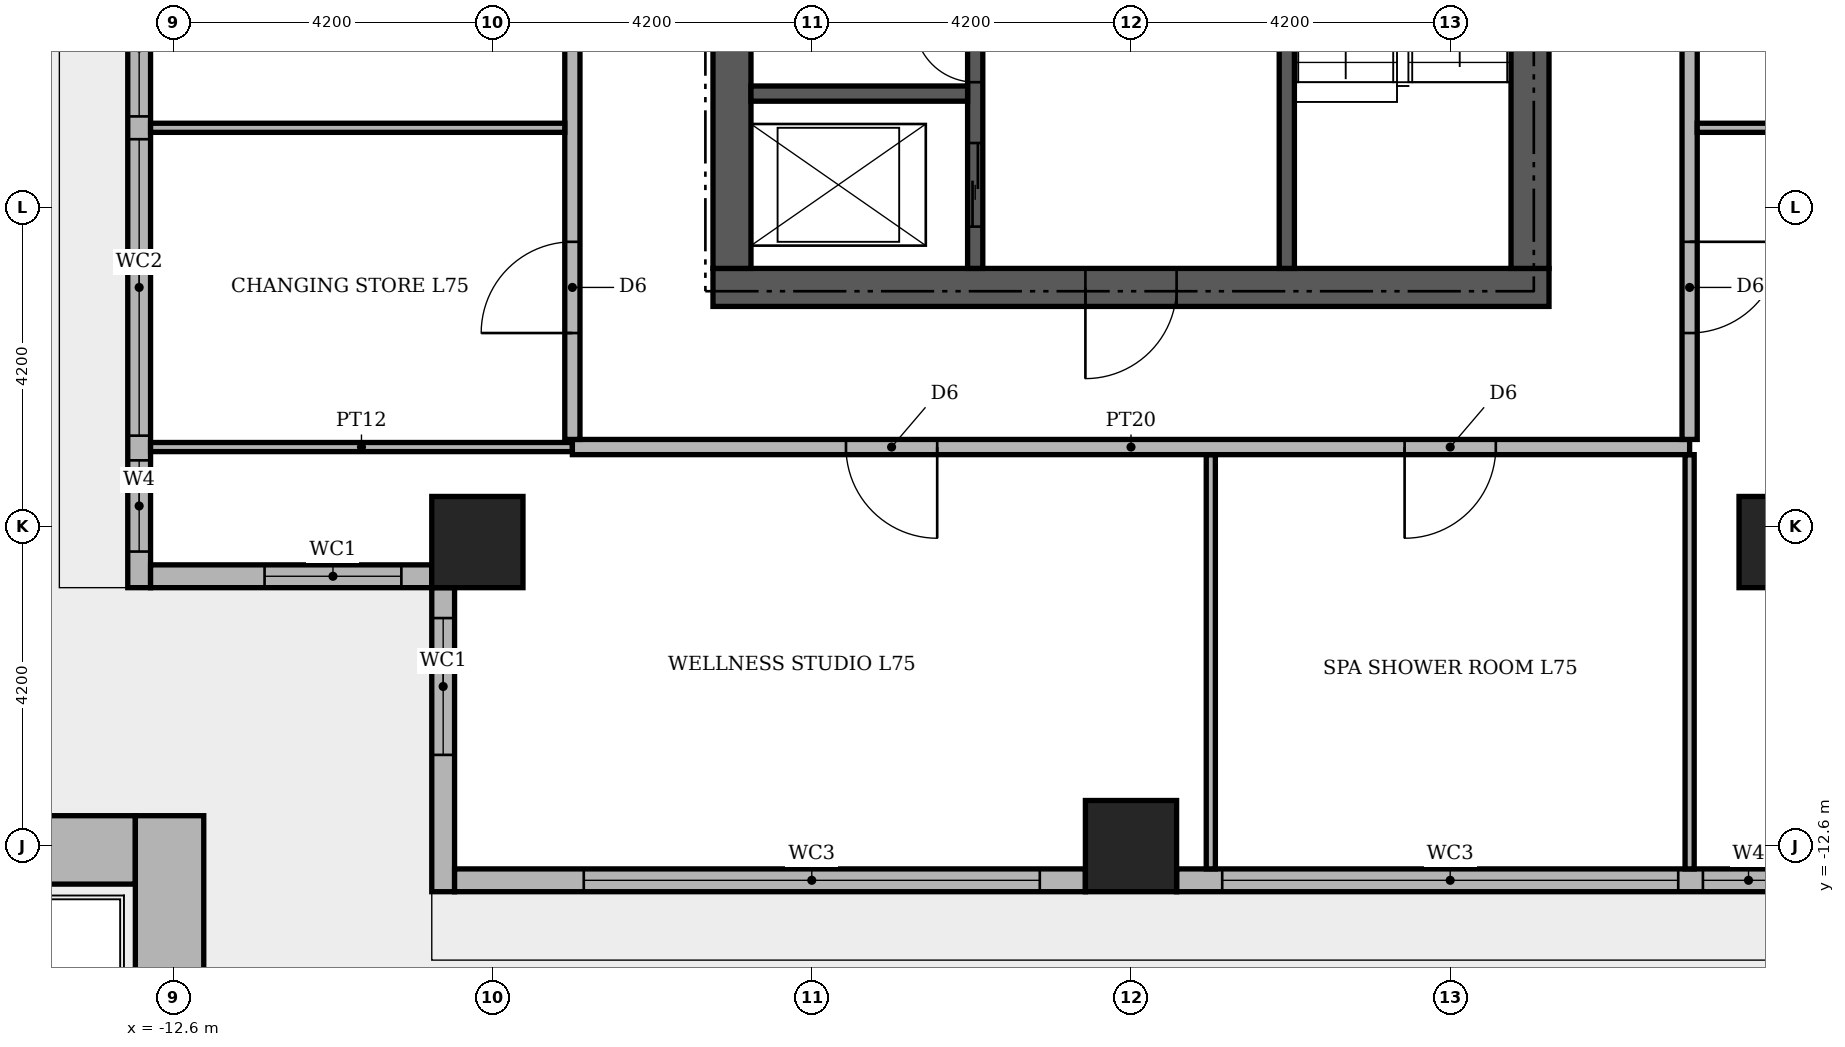
"""IFC4 building model, lengths in metres.
Left out: names, types, materials, properties, quantities, classifications, styles, units other than length and angle.
Written with IfcOpenShell. Run it as: python <this file> out.ifc"""

import sys

from ifc_helpers import new_model, si_unit, direction, frame, frame_2d, origin, origin_2d, place, context, subcontext, project, spatial, rectangle, extrude, element, fill, save


model = new_model("IFC4")
c1 = context("Model", 3, precision=1e-05, world=origin(), true_north=direction((0.0, 1.0)))
c2 = subcontext(c1, "Body", "Model", "MODEL_VIEW")
j1 = project(units=[si_unit("LENGTHUNIT", "METRE"), si_unit("PLANEANGLEUNIT", "RADIAN")], contexts=[c1])
p1 = place(None, origin())
s1 = spatial("IfcSite", under=j1, at=p1, CompositionType="ELEMENT")
p2 = place(p1, origin())
s2 = spatial("IfcBuilding", under=s1, at=p2, CompositionType="ELEMENT")
p3 = place(p2, frame((0.0, 0.0, 312.3)))
s3 = spatial("IfcBuildingStorey", under=s2, at=p3, CompositionType="ELEMENT", Elevation=312.3)
p4 = place(p3, frame((-5.5, -5.25, 0.0), z_axis=(0.0, 0.0, 1.0), x_axis=(1.0, 0.0, 0.0)))
e1 = element("IfcWall", 1, at=p4, inside=s3, PredefinedType="SHEAR", context=c2, shape_type="SweptSolid", body=[
    extrude(rectangle(XDim=11.0, YDim=0.5, at=frame_2d((5.5, 0.0))), origin(), (0.0, 0.0, 1.0), 3.55),
])
p5 = place(p4, frame((4.9, 0.0, 0.0)))
e2 = element("IfcOpeningElement", 2, at=p5, cuts=e1, PredefinedType="OPENING", context=c2, shape_type="SweptSolid", body=[
    extrude(rectangle(XDim=1.2, YDim=2.1, at=frame_2d((0.6, 1.05))), frame((0.0, 0.26, 0.0), z_axis=(0.0, -1.0, 0.0), x_axis=(1.0, 0.0, 0.0)), (0.0, 0.0, 1.0), 0.52),
])
for number, where, z_axis, x_axis in (
    (3, (-5.25, -5.0, 0.0), (0.0, 0.0, 1.0), (0.0, 1.0, 0.0)),
    (4, (5.25, -5.0, 0.0), (0.0, 0.0, 1.0), (0.0, 1.0, 0.0)),
):
    element("IfcWall", number, at=place(p3, frame(where, z_axis=z_axis, x_axis=x_axis)), inside=s3, PredefinedType="SHEAR", context=c2, shape_type="SweptSolid", body=[
        extrude(rectangle(XDim=10.5, YDim=0.5, at=frame_2d((5.25, 0.0))), origin(), (0.0, 0.0, 1.0), 3.55),
    ])
p6 = place(p3, frame((2.05, -5.0, 0.0), z_axis=(0.0, 0.0, 1.0), x_axis=(0.0, 1.0, 0.0)))
e5 = element("IfcWall", 5, at=p6, inside=s3, PredefinedType="SHEAR", context=c2, shape_type="SweptSolid", body=[
    extrude(rectangle(XDim=6.6, YDim=0.2, at=frame_2d((3.3, 0.0))), origin(), (0.0, 0.0, 1.0), 3.55),
])
p7 = place(p6, frame((5.25, 0.0, 0.0)))
e6 = element("IfcOpeningElement", 6, at=p7, cuts=e5, PredefinedType="OPENING", context=c2, shape_type="SweptSolid", body=[
    extrude(rectangle(XDim=1.0, YDim=2.1, at=frame_2d((0.5, 1.05))), frame((0.0, 0.11, 0.0), z_axis=(0.0, -1.0, 0.0), x_axis=(1.0, 0.0, 0.0)), (0.0, 0.0, 1.0), 0.22),
])
p8 = place(p3, frame((-2.05, -5.0, 0.0), z_axis=(0.0, 0.0, 1.0), x_axis=(0.0, 1.0, 0.0)))
e7 = element("IfcWall", 7, at=p8, inside=s3, PredefinedType="SHEAR", context=c2, shape_type="SweptSolid", body=[
    extrude(rectangle(XDim=3.4, YDim=0.2, at=frame_2d((1.7, 0.0))), origin(), (0.0, 0.0, 1.0), 3.55),
])
p9 = place(p8, frame((0.55, 0.0, 0.0)))
e8 = element("IfcOpeningElement", 8, at=p9, cuts=e7, PredefinedType="OPENING", context=c2, shape_type="SweptSolid", body=[
    extrude(rectangle(XDim=1.1, YDim=2.1, at=frame_2d((0.55, 1.05))), frame((0.0, 0.11, 0.0), z_axis=(0.0, -1.0, 0.0), x_axis=(1.0, 0.0, 0.0)), (0.0, 0.0, 1.0), 0.22),
])
p10 = place(p8, frame((2.45, 0.0, 0.0)))
e9 = element("IfcOpeningElement", 9, at=p10, cuts=e7, PredefinedType="OPENING", context=c2, shape_type="SweptSolid", body=[
    extrude(rectangle(XDim=0.8, YDim=2.1, at=frame_2d((0.4, 1.05))), frame((0.0, 0.11, 0.0), z_axis=(0.0, -1.0, 0.0), x_axis=(1.0, 0.0, 0.0)), (0.0, 0.0, 1.0), 0.22),
])
p11 = place(p3, frame((-5.0, -2.7, 0.0), z_axis=(0.0, 0.0, 1.0), x_axis=(1.0, 0.0, 0.0)))
e10 = element("IfcWall", 10, at=p11, inside=s3, PredefinedType="SHEAR", context=c2, shape_type="SweptSolid", body=[
    extrude(rectangle(XDim=2.85, YDim=0.2, at=frame_2d((1.425, 0.0))), origin(), (0.0, 0.0, 1.0), 3.55),
])
for number, where, z_axis, x_axis in (
    (11, (8.6, -8.6, -0.35), (0.0, 0.0, 1.0), (1.0, 0.0, 0.0)),
    (12, (0.0, -12.6, -0.35), (0.0, 0.0, 1.0), (1.0, 0.0, 0.0)),
    (13, (-8.6, -8.6, -0.35), (0.0, 0.0, 1.0), (1.0, 0.0, 0.0)),
):
    element("IfcColumn", number, at=place(p3, frame(where, z_axis=z_axis, x_axis=x_axis)), inside=s3, PredefinedType="COLUMN", context=c2, shape_type="SweptSolid", body=[
        extrude(rectangle(XDim=1.2, YDim=1.2, at=origin_2d()), origin(), (0.0, 0.0, 1.0), 4.25),
    ])
p12 = place(p3, frame((-13.05, -0.6, 0.0), z_axis=(0.0, 0.0, 1.0), x_axis=(0.0, -1.0, 0.0)))
e14 = element("IfcWall", 14, at=p12, inside=s3, PredefinedType="STANDARD", context=c2, shape_type="SweptSolid", body=[
    extrude(rectangle(XDim=8.6, YDim=0.3, at=frame_2d((4.3, 0.0))), origin(), (0.0, 0.0, 1.0), 3.55),
])
p13 = place(p12, frame((0.6, 0.0, 0.6)))
e15 = element("IfcOpeningElement", 15, at=p13, cuts=e14, PredefinedType="OPENING", context=c2, shape_type="SweptSolid", body=[
    extrude(rectangle(XDim=1.8, YDim=2.4, at=frame_2d((0.9, 1.2))), frame((0.0, 0.16, 0.0), z_axis=(0.0, -1.0, 0.0), x_axis=(1.0, 0.0, 0.0)), (0.0, 0.0, 1.0), 0.32),
])
p14 = place(p12, frame((2.7, 0.0, 0.6)))
e16 = element("IfcOpeningElement", 16, at=p14, cuts=e14, PredefinedType="OPENING", context=c2, shape_type="SweptSolid", body=[
    extrude(rectangle(XDim=3.9, YDim=2.4, at=frame_2d((1.95, 1.2))), frame((0.0, 0.16, 0.0), z_axis=(0.0, -1.0, 0.0), x_axis=(1.0, 0.0, 0.0)), (0.0, 0.0, 1.0), 0.32),
])
p15 = place(p12, frame((6.925, 0.0, 0.9)))
e17 = element("IfcOpeningElement", 17, at=p15, cuts=e14, PredefinedType="OPENING", context=c2, shape_type="SweptSolid", body=[
    extrude(rectangle(XDim=1.2, YDim=2.1, at=frame_2d((0.6, 1.05))), frame((0.0, 0.16, 0.0), z_axis=(0.0, -1.0, 0.0), x_axis=(1.0, 0.0, 0.0)), (0.0, 0.0, 1.0), 0.32),
])
p16 = place(p3, frame((-12.9, -9.05, 0.0), z_axis=(0.0, 0.0, 1.0), x_axis=(1.0, 0.0, 0.0)))
e18 = element("IfcWall", 18, at=p16, inside=s3, PredefinedType="STANDARD", context=c2, shape_type="SweptSolid", body=[
    extrude(rectangle(XDim=3.7, YDim=0.3, at=frame_2d((1.85, 0.0))), origin(), (0.0, 0.0, 1.0), 3.55),
])
p17 = place(p16, frame((1.5, 0.0, 0.6)))
e19 = element("IfcOpeningElement", 19, at=p17, cuts=e18, PredefinedType="OPENING", context=c2, shape_type="SweptSolid", body=[
    extrude(rectangle(XDim=1.8, YDim=2.4, at=frame_2d((0.9, 1.2))), frame((0.0, 0.16, 0.0), z_axis=(0.0, -1.0, 0.0), x_axis=(1.0, 0.0, 0.0)), (0.0, 0.0, 1.0), 0.32),
])
p18 = place(p3, frame((-9.05, -9.2, 0.0), z_axis=(0.0, 0.0, 1.0), x_axis=(0.0, -1.0, 0.0)))
e20 = element("IfcWall", 20, at=p18, inside=s3, PredefinedType="STANDARD", context=c2, shape_type="SweptSolid", body=[
    extrude(rectangle(XDim=4.0, YDim=0.3, at=frame_2d((2.0, 0.0))), origin(), (0.0, 0.0, 1.0), 3.55),
])
p19 = place(p18, frame((0.4, 0.0, 0.6)))
e21 = element("IfcOpeningElement", 21, at=p19, cuts=e20, PredefinedType="OPENING", context=c2, shape_type="SweptSolid", body=[
    extrude(rectangle(XDim=1.8, YDim=2.4, at=frame_2d((0.9, 1.2))), frame((0.0, 0.16, 0.0), z_axis=(0.0, -1.0, 0.0), x_axis=(1.0, 0.0, 0.0)), (0.0, 0.0, 1.0), 0.32),
])
p20 = place(p3, frame((-8.9, -13.05, 0.0), z_axis=(0.0, 0.0, 1.0), x_axis=(1.0, 0.0, 0.0)))
e22 = element("IfcWall", 22, at=p20, inside=s3, PredefinedType="STANDARD", context=c2, shape_type="SweptSolid", body=[
    extrude(rectangle(XDim=8.3, YDim=0.3, at=frame_2d((4.15, 0.0))), origin(), (0.0, 0.0, 1.0), 3.55),
])
p21 = place(p20, frame((1.7, 0.0, 0.6)))
e23 = element("IfcOpeningElement", 23, at=p21, cuts=e22, PredefinedType="OPENING", context=c2, shape_type="SweptSolid", body=[
    extrude(rectangle(XDim=6.0, YDim=2.4, at=frame_2d((3.0, 1.2))), frame((0.0, 0.16, 0.0), z_axis=(0.0, -1.0, 0.0), x_axis=(1.0, 0.0, 0.0)), (0.0, 0.0, 1.0), 0.32),
])
p22 = place(p3, frame((0.6, -13.05, 0.0), z_axis=(0.0, 0.0, 1.0), x_axis=(1.0, 0.0, 0.0)))
e24 = element("IfcWall", 24, at=p22, inside=s3, PredefinedType="STANDARD", context=c2, shape_type="SweptSolid", body=[
    extrude(rectangle(XDim=8.6, YDim=0.3, at=frame_2d((4.3, 0.0))), origin(), (0.0, 0.0, 1.0), 3.55),
])
p23 = place(p22, frame((0.6, 0.0, 0.6)))
e25 = element("IfcOpeningElement", 25, at=p23, cuts=e24, PredefinedType="OPENING", context=c2, shape_type="SweptSolid", body=[
    extrude(rectangle(XDim=6.0, YDim=2.4, at=frame_2d((3.0, 1.2))), frame((0.0, 0.16, 0.0), z_axis=(0.0, -1.0, 0.0), x_axis=(1.0, 0.0, 0.0)), (0.0, 0.0, 1.0), 0.32),
])
p24 = place(p22, frame((6.925, 0.0, 0.9)))
e26 = element("IfcOpeningElement", 26, at=p24, cuts=e24, PredefinedType="OPENING", context=c2, shape_type="SweptSolid", body=[
    extrude(rectangle(XDim=1.2, YDim=2.1, at=frame_2d((0.6, 1.05))), frame((0.0, 0.16, 0.0), z_axis=(0.0, -1.0, 0.0), x_axis=(1.0, 0.0, 0.0)), (0.0, 0.0, 1.0), 0.32),
])
p25 = place(p3, frame((-17.7, -12.65, 0.0), z_axis=(0.0, 0.0, 1.0), x_axis=(1.0, 0.0, 0.0)))
e27 = element("IfcWall", 27, at=p25, inside=s3, PredefinedType="MOVABLE", context=c2, shape_type="SweptSolid", body=[
    extrude(rectangle(XDim=4.6, YDim=0.9, at=frame_2d((2.3, 0.0))), origin(), (0.0, 0.0, 1.0), 0.6),
])
p26 = place(p3, frame((-12.65, -18.6, 0.0), z_axis=(0.0, 0.0, 1.0), x_axis=(0.0, 1.0, 0.0)))
e28 = element("IfcWall", 28, at=p26, inside=s3, PredefinedType="MOVABLE", context=c2, shape_type="SweptSolid", body=[
    extrude(rectangle(XDim=6.4, YDim=0.9, at=frame_2d((3.2, 0.0))), origin(), (0.0, 0.0, 1.0), 0.6),
])
for number, where, z_axis, x_axis in (
    (29, (1.05, -12.9, 0.0), (0.0, 0.0, 1.0), (0.0, 1.0, 0.0)),
    (30, (7.35, -12.9, 0.0), (0.0, 0.0, 1.0), (0.0, 1.0, 0.0)),
):
    element("IfcWall", number, at=place(p3, frame(where, z_axis=z_axis, x_axis=x_axis)), inside=s3, PredefinedType="PARTITIONING", context=c2, shape_type="SweptSolid", body=[
        extrude(rectangle(XDim=5.45, YDim=0.12, at=frame_2d((2.725, 0.0))), origin(), (0.0, 0.0, 1.0), 3.55),
    ])
p27 = place(p3, frame((-12.9, -7.35, 0.0), z_axis=(0.0, 0.0, 1.0), x_axis=(1.0, 0.0, 0.0)))
e31 = element("IfcWall", 31, at=p27, inside=s3, PredefinedType="PARTITIONING", context=c2, shape_type="SweptSolid", body=[
    extrude(rectangle(XDim=5.55, YDim=0.12, at=frame_2d((2.775, 0.0))), origin(), (0.0, 0.0, 1.0), 3.55),
])
p28 = place(p3, frame((-7.35, -7.35, 0.0), z_axis=(0.0, 0.0, 1.0), x_axis=(1.0, 0.0, 0.0)))
e32 = element("IfcWall", 32, at=p28, inside=s3, PredefinedType="PARTITIONING", context=c2, shape_type="SweptSolid", body=[
    extrude(rectangle(XDim=14.7, YDim=0.2, at=frame_2d((7.35, 0.0))), origin(), (0.0, 0.0, 1.0), 3.55),
])
p29 = place(p28, frame((3.6, 0.0, 0.0)))
e33 = element("IfcOpeningElement", 33, at=p29, cuts=e32, PredefinedType="OPENING", context=c2, shape_type="SweptSolid", body=[
    extrude(rectangle(XDim=1.2, YDim=2.1, at=frame_2d((0.6, 1.05))), frame((0.0, 0.11, 0.0), z_axis=(0.0, -1.0, 0.0), x_axis=(1.0, 0.0, 0.0)), (0.0, 0.0, 1.0), 0.22),
])
p30 = place(p28, frame((10.95, 0.0, 0.0)))
e34 = element("IfcOpeningElement", 34, at=p30, cuts=e32, PredefinedType="OPENING", context=c2, shape_type="SweptSolid", body=[
    extrude(rectangle(XDim=1.2, YDim=2.1, at=frame_2d((0.6, 1.05))), frame((0.0, 0.11, 0.0), z_axis=(0.0, -1.0, 0.0), x_axis=(1.0, 0.0, 0.0)), (0.0, 0.0, 1.0), 0.22),
])
p31 = place(p3, frame((-7.35, -7.25, 0.0), z_axis=(0.0, 0.0, 1.0), x_axis=(0.0, 1.0, 0.0)))
e35 = element("IfcWall", 35, at=p31, inside=s3, PredefinedType="PARTITIONING", context=c2, shape_type="SweptSolid", body=[
    extrude(rectangle(XDim=14.5, YDim=0.2, at=frame_2d((7.25, 0.0))), origin(), (0.0, 0.0, 1.0), 3.55),
])
p32 = place(p31, frame((8.75, 0.0, 0.0)))
e36 = element("IfcOpeningElement", 36, at=p32, cuts=e35, PredefinedType="OPENING", context=c2, shape_type="SweptSolid", body=[
    extrude(rectangle(XDim=1.2, YDim=2.1, at=frame_2d((0.6, 1.05))), frame((0.0, 0.11, 0.0), z_axis=(0.0, -1.0, 0.0), x_axis=(1.0, 0.0, 0.0)), (0.0, 0.0, 1.0), 0.22),
])
p33 = place(p31, frame((1.4, 0.0, 0.0)))
e37 = element("IfcOpeningElement", 37, at=p33, cuts=e35, PredefinedType="OPENING", context=c2, shape_type="SweptSolid", body=[
    extrude(rectangle(XDim=1.2, YDim=2.1, at=frame_2d((0.6, 1.05))), frame((0.0, 0.11, 0.0), z_axis=(0.0, -1.0, 0.0), x_axis=(1.0, 0.0, 0.0)), (0.0, 0.0, 1.0), 0.22),
])
p34 = place(p3, frame((7.35, -7.25, 0.0), z_axis=(0.0, 0.0, 1.0), x_axis=(0.0, 1.0, 0.0)))
e38 = element("IfcWall", 38, at=p34, inside=s3, PredefinedType="PARTITIONING", context=c2, shape_type="SweptSolid", body=[
    extrude(rectangle(XDim=14.5, YDim=0.2, at=frame_2d((7.25, 0.0))), origin(), (0.0, 0.0, 1.0), 3.55),
])
p35 = place(p34, frame((1.4, 0.0, 0.0)))
e39 = element("IfcOpeningElement", 39, at=p35, cuts=e38, PredefinedType="OPENING", context=c2, shape_type="SweptSolid", body=[
    extrude(rectangle(XDim=1.2, YDim=2.1, at=frame_2d((0.6, 1.05))), frame((0.0, 0.11, 0.0), z_axis=(0.0, -1.0, 0.0), x_axis=(1.0, 0.0, 0.0)), (0.0, 0.0, 1.0), 0.22),
])
p36 = place(p34, frame((8.75, 0.0, 0.0)))
e40 = element("IfcOpeningElement", 40, at=p36, cuts=e38, PredefinedType="OPENING", context=c2, shape_type="SweptSolid", body=[
    extrude(rectangle(XDim=1.2, YDim=2.1, at=frame_2d((0.6, 1.05))), frame((0.0, 0.11, 0.0), z_axis=(0.0, -1.0, 0.0), x_axis=(1.0, 0.0, 0.0)), (0.0, 0.0, 1.0), 0.22),
])
for number, where, z_axis, x_axis in (
    (41, (-12.9, -3.15, 0.0), (0.0, 0.0, 1.0), (1.0, 0.0, 0.0)),
    (42, (7.45, -3.15, 0.0), (0.0, 0.0, 1.0), (1.0, 0.0, 0.0)),
):
    element("IfcWall", number, at=place(p3, frame(where, z_axis=z_axis, x_axis=x_axis)), inside=s3, PredefinedType="PARTITIONING", context=c2, shape_type="SweptSolid", body=[
        extrude(rectangle(XDim=5.45, YDim=0.12, at=frame_2d((2.725, 0.0))), origin(), (0.0, 0.0, 1.0), 3.55),
    ])
p37 = place(p13, origin())
e43 = element("IfcWindow", 43, at=p37, inside=s3, PartitioningType="SINGLE_PANEL", PredefinedType="WINDOW", context=c2, shape_type="SweptSolid", body=[
    extrude(rectangle(XDim=1.8, YDim=2.4, at=frame_2d((0.9, 1.2))), frame((0.0, 0.03, 0.0), z_axis=(0.0, -1.0, 0.0), x_axis=(1.0, 0.0, 0.0)), (0.0, 0.0, 1.0), 0.06),
])
fill(e15, e43)
p38 = place(p14, origin())
e44 = element("IfcWindow", 44, at=p38, inside=s3, PartitioningType="SINGLE_PANEL", PredefinedType="WINDOW", context=c2, shape_type="SweptSolid", body=[
    extrude(rectangle(XDim=3.9, YDim=2.4, at=frame_2d((1.95, 1.2))), frame((0.0, 0.03, 0.0), z_axis=(0.0, -1.0, 0.0), x_axis=(1.0, 0.0, 0.0)), (0.0, 0.0, 1.0), 0.06),
])
fill(e16, e44)
p39 = place(p15, origin())
e45 = element("IfcWindow", 45, at=p39, inside=s3, PartitioningType="SINGLE_PANEL", PredefinedType="WINDOW", context=c2, shape_type="SweptSolid", body=[
    extrude(rectangle(XDim=1.2, YDim=2.1, at=frame_2d((0.6, 1.05))), frame((0.0, 0.03, 0.0), z_axis=(0.0, -1.0, 0.0), x_axis=(1.0, 0.0, 0.0)), (0.0, 0.0, 1.0), 0.06),
])
fill(e17, e45)
p40 = place(p17, origin())
e46 = element("IfcWindow", 46, at=p40, inside=s3, PartitioningType="SINGLE_PANEL", PredefinedType="WINDOW", context=c2, shape_type="SweptSolid", body=[
    extrude(rectangle(XDim=1.8, YDim=2.4, at=frame_2d((0.9, 1.2))), frame((0.0, 0.03, 0.0), z_axis=(0.0, -1.0, 0.0), x_axis=(1.0, 0.0, 0.0)), (0.0, 0.0, 1.0), 0.06),
])
fill(e19, e46)
p41 = place(p19, origin())
e47 = element("IfcWindow", 47, at=p41, inside=s3, PartitioningType="SINGLE_PANEL", PredefinedType="WINDOW", context=c2, shape_type="SweptSolid", body=[
    extrude(rectangle(XDim=1.8, YDim=2.4, at=frame_2d((0.9, 1.2))), frame((0.0, 0.03, 0.0), z_axis=(0.0, -1.0, 0.0), x_axis=(1.0, 0.0, 0.0)), (0.0, 0.0, 1.0), 0.06),
])
fill(e21, e47)
p42 = place(p21, origin())
e48 = element("IfcWindow", 48, at=p42, inside=s3, PartitioningType="SINGLE_PANEL", PredefinedType="WINDOW", context=c2, shape_type="SweptSolid", body=[
    extrude(rectangle(XDim=6.0, YDim=2.4, at=frame_2d((3.0, 1.2))), frame((0.0, 0.03, 0.0), z_axis=(0.0, -1.0, 0.0), x_axis=(1.0, 0.0, 0.0)), (0.0, 0.0, 1.0), 0.06),
])
fill(e23, e48)
p43 = place(p23, origin())
e49 = element("IfcWindow", 49, at=p43, inside=s3, PartitioningType="SINGLE_PANEL", PredefinedType="WINDOW", context=c2, shape_type="SweptSolid", body=[
    extrude(rectangle(XDim=6.0, YDim=2.4, at=frame_2d((3.0, 1.2))), frame((0.0, 0.03, 0.0), z_axis=(0.0, -1.0, 0.0), x_axis=(1.0, 0.0, 0.0)), (0.0, 0.0, 1.0), 0.06),
])
fill(e25, e49)
p44 = place(p24, origin())
e50 = element("IfcWindow", 50, at=p44, inside=s3, PartitioningType="SINGLE_PANEL", PredefinedType="WINDOW", context=c2, shape_type="SweptSolid", body=[
    extrude(rectangle(XDim=1.2, YDim=2.1, at=frame_2d((0.6, 1.05))), frame((0.0, 0.03, 0.0), z_axis=(0.0, -1.0, 0.0), x_axis=(1.0, 0.0, 0.0)), (0.0, 0.0, 1.0), 0.06),
])
fill(e26, e50)
p45 = place(p9, origin())
e51 = element("IfcDoor", 51, at=p45, inside=s3, OperationType="SLIDING_TO_LEFT", PredefinedType="DOOR", context=c2, shape_type="SweptSolid", body=[
    extrude(rectangle(XDim=1.1, YDim=2.1, at=frame_2d((0.55, 1.05))), frame((0.0, 0.025, 0.0), z_axis=(0.0, -1.0, 0.0), x_axis=(1.0, 0.0, 0.0)), (0.0, 0.0, 1.0), 0.05),
])
fill(e8, e51)
p46 = place(p10, origin())
e52 = element("IfcDoor", 52, at=p46, inside=s3, OperationType="SINGLE_SWING_RIGHT", PredefinedType="DOOR", context=c2, shape_type="SweptSolid", body=[
    extrude(rectangle(XDim=0.8, YDim=2.1, at=frame_2d((0.4, 1.05))), frame((0.0, 0.025, 0.0), z_axis=(0.0, -1.0, 0.0), x_axis=(1.0, 0.0, 0.0)), (0.0, 0.0, 1.0), 0.05),
])
fill(e9, e52)
p47 = place(p5, frame((1.2, 0.0, 0.0), z_axis=(0.0, 0.0, 1.0), x_axis=(-1.0, 0.0, 0.0)))
e53 = element("IfcDoor", 53, at=p47, inside=s3, OperationType="SINGLE_SWING_LEFT", PredefinedType="DOOR", context=c2, shape_type="SweptSolid", body=[
    extrude(rectangle(XDim=1.2, YDim=2.1, at=frame_2d((0.6, 1.05))), frame((0.0, 0.025, 0.0), z_axis=(0.0, -1.0, 0.0), x_axis=(1.0, 0.0, 0.0)), (0.0, 0.0, 1.0), 0.05),
])
fill(e2, e53)
p48 = place(p29, frame((1.2, 0.0, 0.0), z_axis=(0.0, 0.0, 1.0), x_axis=(-1.0, 0.0, 0.0)))
e54 = element("IfcDoor", 54, at=p48, inside=s3, OperationType="SINGLE_SWING_RIGHT", PredefinedType="DOOR", context=c2, shape_type="SweptSolid", body=[
    extrude(rectangle(XDim=1.2, YDim=2.1, at=frame_2d((0.6, 1.05))), frame((0.0, 0.025, 0.0), z_axis=(0.0, -1.0, 0.0), x_axis=(1.0, 0.0, 0.0)), (0.0, 0.0, 1.0), 0.05),
])
fill(e33, e54)
p49 = place(p30, frame((1.2, 0.0, 0.0), z_axis=(0.0, 0.0, 1.0), x_axis=(-1.0, 0.0, 0.0)))
e55 = element("IfcDoor", 55, at=p49, inside=s3, OperationType="SINGLE_SWING_LEFT", PredefinedType="DOOR", context=c2, shape_type="SweptSolid", body=[
    extrude(rectangle(XDim=1.2, YDim=2.1, at=frame_2d((0.6, 1.05))), frame((0.0, 0.025, 0.0), z_axis=(0.0, -1.0, 0.0), x_axis=(1.0, 0.0, 0.0)), (0.0, 0.0, 1.0), 0.05),
])
fill(e34, e55)
p50 = place(p35, frame((1.2, 0.0, 0.0), z_axis=(0.0, 0.0, 1.0), x_axis=(-1.0, 0.0, 0.0)))
e56 = element("IfcDoor", 56, at=p50, inside=s3, OperationType="SINGLE_SWING_RIGHT", PredefinedType="DOOR", context=c2, shape_type="SweptSolid", body=[
    extrude(rectangle(XDim=1.2, YDim=2.1, at=frame_2d((0.6, 1.05))), frame((0.0, 0.025, 0.0), z_axis=(0.0, -1.0, 0.0), x_axis=(1.0, 0.0, 0.0)), (0.0, 0.0, 1.0), 0.05),
])
fill(e39, e56)
p51 = place(p33, origin())
e57 = element("IfcDoor", 57, at=p51, inside=s3, OperationType="SINGLE_SWING_LEFT", PredefinedType="DOOR", context=c2, shape_type="SweptSolid", body=[
    extrude(rectangle(XDim=1.2, YDim=2.1, at=frame_2d((0.6, 1.05))), frame((0.0, 0.025, 0.0), z_axis=(0.0, -1.0, 0.0), x_axis=(1.0, 0.0, 0.0)), (0.0, 0.0, 1.0), 0.05),
])
fill(e37, e57)
save(model, sys.argv[1])
